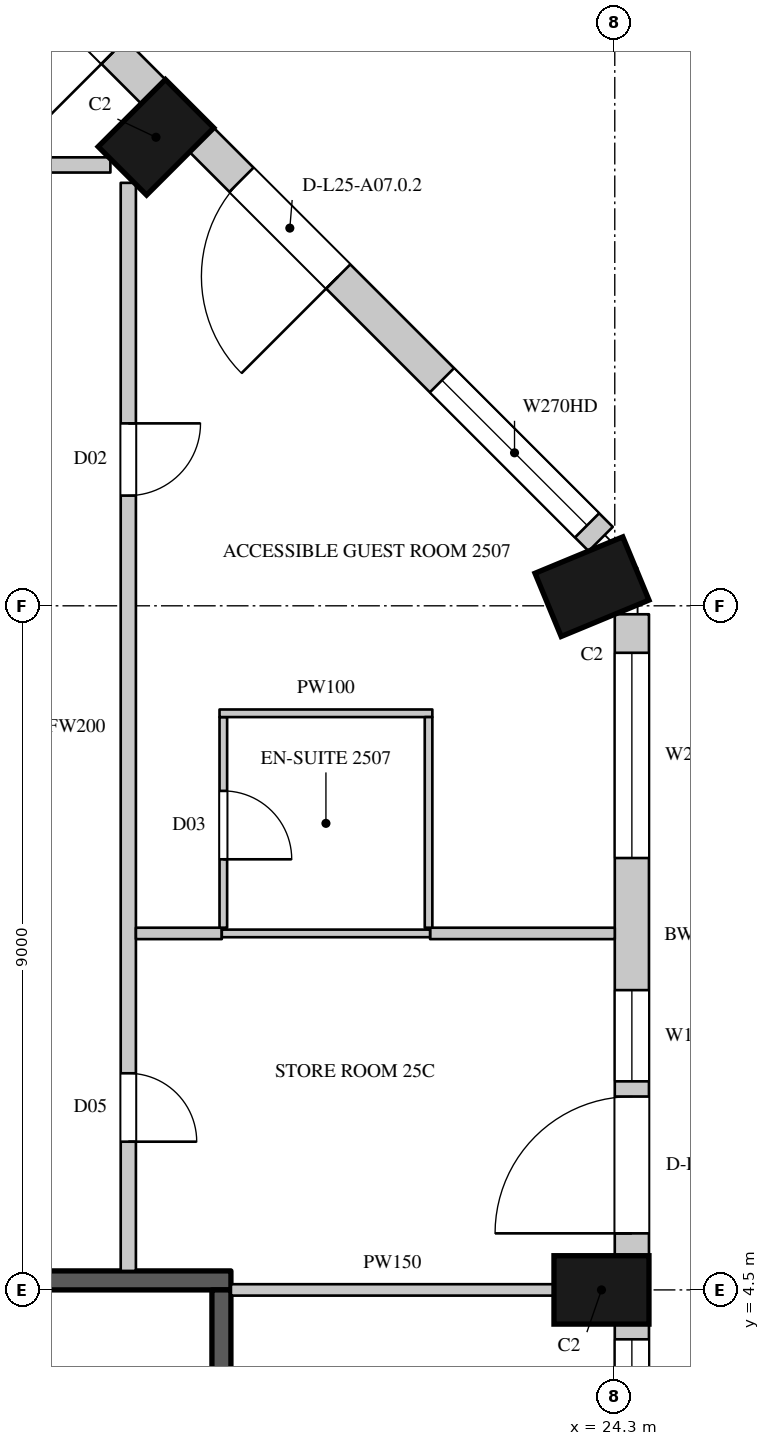
"""IFC4 building model, lengths in metres.
Left out: names, types, materials, properties, quantities, classifications, styles, units other than length and angle.
Written with IfcOpenShell. Run it as: python <this file> out.ifc"""

import sys

from ifc_helpers import new_model, si_unit, direction, frame, frame_2d, origin, origin_2d, place, context, subcontext, project, spatial, rectangle, extrude, element, fill, save


model = new_model("IFC4")
c1 = context("Model", 3, precision=1e-05, world=origin(), true_north=direction((0.0, 1.0)))
c2 = subcontext(c1, "Body", "Model", "MODEL_VIEW")
j1 = project(units=[si_unit("LENGTHUNIT", "METRE"), si_unit("PLANEANGLEUNIT", "RADIAN")], contexts=[c1])
p1 = place(None, origin())
s1 = spatial("IfcSite", under=j1, at=p1, CompositionType="ELEMENT")
p2 = place(p1, origin())
s2 = spatial("IfcBuilding", under=s1, at=p2, CompositionType="ELEMENT")
p3 = place(p2, frame((0.0, 0.0, 120.3)))
s3 = spatial("IfcBuildingStorey", under=s2, at=p3, CompositionType="ELEMENT", Elevation=120.3)
for number, where, z_axis, x_axis in (
    (1, (24.125, 4.5, 0.0), (0.0, 0.0, 1.0), (0.0, 1.0, 0.0)),
    (2, (24.0, 13.752, 0.0), (0.0, 0.0, 1.0), (-0.383, 0.924, 0.0)),
    (3, (18.264, 19.664, 0.0), (0.0, 0.0, 1.0), (-0.707, 0.707, 0.0)),
):
    element("IfcColumn", number, at=place(p3, frame(where, z_axis=z_axis, x_axis=x_axis)), inside=s3, PredefinedType="COLUMN", context=c2, shape_type="SweptSolid", body=[
        extrude(rectangle(XDim=0.9, YDim=1.25, at=origin_2d()), origin(), (0.0, 0.0, 1.0), 3.6),
    ])
p4 = place(p3, frame((24.525, -4.05, 0.0), z_axis=(0.0, 0.0, 1.0), x_axis=(0.0, 1.0, 0.0)))
e4 = element("IfcWall", 4, at=p4, inside=s3, PredefinedType="SOLIDWALL", context=c2, shape_type="SweptSolid", body=[
    extrude(rectangle(XDim=8.1, YDim=0.45, at=frame_2d((4.05, 0.0))), origin(), (0.0, 0.0, 1.0), 3.3),
])
p5 = place(p4, frame((0.2, 0.0, 0.0)))
e5 = element("IfcOpeningElement", 5, at=p5, cuts=e4, PredefinedType="OPENING", context=c2, shape_type="SweptSolid", body=[
    extrude(rectangle(XDim=1.8, YDim=2.4, at=frame_2d((0.9, 1.2))), frame((0.0, 0.235, 0.0), z_axis=(0.0, -1.0, 0.0), x_axis=(1.0, 0.0, 0.0)), (0.0, 0.0, 1.0), 0.47),
])
p6 = place(p4, frame((2.2, 0.0, 1.05)))
e6 = element("IfcOpeningElement", 6, at=p6, cuts=e4, PredefinedType="OPENING", context=c2, shape_type="SweptSolid", body=[
    extrude(rectangle(XDim=1.2, YDim=2.0, at=frame_2d((0.6, 1.0))), frame((0.0, 0.235, 0.0), z_axis=(0.0, -1.0, 0.0), x_axis=(1.0, 0.0, 0.0)), (0.0, 0.0, 1.0), 0.47),
])
p7 = place(p4, frame((4.7, 0.0, 0.0)))
e7 = element("IfcOpeningElement", 7, at=p7, cuts=e4, PredefinedType="OPENING", context=c2, shape_type="SweptSolid", body=[
    extrude(rectangle(XDim=1.8, YDim=2.4, at=frame_2d((0.9, 1.2))), frame((0.0, 0.235, 0.0), z_axis=(0.0, -1.0, 0.0), x_axis=(1.0, 0.0, 0.0)), (0.0, 0.0, 1.0), 0.47),
])
p8 = place(p4, frame((6.7, 0.0, 1.05)))
e8 = element("IfcOpeningElement", 8, at=p8, cuts=e4, PredefinedType="OPENING", context=c2, shape_type="SweptSolid", body=[
    extrude(rectangle(XDim=1.2, YDim=2.0, at=frame_2d((0.6, 1.0))), frame((0.0, 0.235, 0.0), z_axis=(0.0, -1.0, 0.0), x_axis=(1.0, 0.0, 0.0)), (0.0, 0.0, 1.0), 0.47),
])
p9 = place(p3, frame((24.525, 4.95, 0.0), z_axis=(0.0, 0.0, 1.0), x_axis=(0.0, 1.0, 0.0)))
e9 = element("IfcWall", 9, at=p9, inside=s3, PredefinedType="SOLIDWALL", context=c2, shape_type="SweptSolid", body=[
    extrude(rectangle(XDim=8.439, YDim=0.45, at=frame_2d((4.219, 0.0))), origin(), (0.0, 0.0, 1.0), 3.3),
])
p10 = place(p9, frame((0.294, 0.0, 0.0)))
e10 = element("IfcOpeningElement", 10, at=p10, cuts=e9, PredefinedType="OPENING", context=c2, shape_type="SweptSolid", body=[
    extrude(rectangle(XDim=1.8, YDim=2.4, at=frame_2d((0.9, 1.2))), frame((0.0, 0.235, 0.0), z_axis=(0.0, -1.0, 0.0), x_axis=(1.0, 0.0, 0.0)), (0.0, 0.0, 1.0), 0.47),
])
p11 = place(p9, frame((2.294, 0.0, 1.05)))
e11 = element("IfcOpeningElement", 11, at=p11, cuts=e9, PredefinedType="OPENING", context=c2, shape_type="SweptSolid", body=[
    extrude(rectangle(XDim=1.2, YDim=2.0, at=frame_2d((0.6, 1.0))), frame((0.0, 0.235, 0.0), z_axis=(0.0, -1.0, 0.0), x_axis=(1.0, 0.0, 0.0)), (0.0, 0.0, 1.0), 0.47),
])
p12 = place(p9, frame((5.232, 0.0, 1.05)))
e12 = element("IfcOpeningElement", 12, at=p12, cuts=e9, PredefinedType="OPENING", context=c2, shape_type="SweptSolid", body=[
    extrude(rectangle(XDim=2.7, YDim=2.0, at=frame_2d((1.35, 1.0))), frame((0.0, 0.235, 0.0), z_axis=(0.0, -1.0, 0.0), x_axis=(1.0, 0.0, 0.0)), (0.0, 0.0, 1.0), 0.47),
])
p13 = place(p3, frame((24.115, 14.379, 0.0), z_axis=(0.0, 0.0, 1.0), x_axis=(-0.707106781187, 0.707106781187, 0.0)))
e13 = element("IfcWall", 13, at=p13, inside=s3, PredefinedType="SOLIDWALL", context=c2, shape_type="SweptSolid", body=[
    extrude(rectangle(XDim=7.424, YDim=0.45, at=frame_2d((3.712, 0.0))), origin(), (0.0, 0.0, 1.0), 3.3),
])
p14 = place(p13, frame((0.253, 0.0, 1.05)))
e14 = element("IfcOpeningElement", 14, at=p14, cuts=e13, PredefinedType="OPENING", context=c2, shape_type="SweptSolid", body=[
    extrude(rectangle(XDim=2.7, YDim=2.0, at=frame_2d((1.35, 1.0))), frame((0.0, 0.235, 0.0), z_axis=(0.0, -1.0, 0.0), x_axis=(1.0, 0.0, 0.0)), (0.0, 0.0, 1.0), 0.47),
])
p15 = place(p13, frame((4.884, 0.0, 0.0)))
e15 = element("IfcOpeningElement", 15, at=p15, cuts=e13, PredefinedType="OPENING", context=c2, shape_type="SweptSolid", body=[
    extrude(rectangle(XDim=1.8, YDim=2.4, at=frame_2d((0.9, 1.2))), frame((0.0, 0.235, 0.0), z_axis=(0.0, -1.0, 0.0), x_axis=(1.0, 0.0, 0.0)), (0.0, 0.0, 1.0), 0.47),
])
p16 = place(p3, frame((18.229, 20.265, 0.0), z_axis=(0.0, 0.0, 1.0), x_axis=(-0.707106781187, 0.707106781187, 0.0)))
e16 = element("IfcWall", 16, at=p16, inside=s3, PredefinedType="SOLIDWALL", context=c2, shape_type="SweptSolid", body=[
    extrude(rectangle(XDim=7.424, YDim=0.45, at=frame_2d((3.712, 0.0))), origin(), (0.0, 0.0, 1.0), 3.3),
])
p17 = place(p16, frame((0.74, 0.0, 0.0)))
e17 = element("IfcOpeningElement", 17, at=p17, cuts=e16, PredefinedType="OPENING", context=c2, shape_type="SweptSolid", body=[
    extrude(rectangle(XDim=1.8, YDim=2.4, at=frame_2d((0.9, 1.2))), frame((0.0, 0.235, 0.0), z_axis=(0.0, -1.0, 0.0), x_axis=(1.0, 0.0, 0.0)), (0.0, 0.0, 1.0), 0.47),
])
p18 = place(p16, frame((4.471, 0.0, 1.05)))
e18 = element("IfcOpeningElement", 18, at=p18, cuts=e16, PredefinedType="OPENING", context=c2, shape_type="SweptSolid", body=[
    extrude(rectangle(XDim=2.7, YDim=2.0, at=frame_2d((1.35, 1.0))), frame((0.0, 0.235, 0.0), z_axis=(0.0, -1.0, 0.0), x_axis=(1.0, 0.0, 0.0)), (0.0, 0.0, 1.0), 0.47),
])
p19 = place(p3, frame((23.15, 16.864, 0.0), z_axis=(0.0, 0.0, 1.0), x_axis=(-0.707106781187, 0.707106781187, 0.0)))
e19 = element("IfcWall", 19, at=p19, inside=s3, PredefinedType="SOLIDWALL", context=c2, shape_type="SweptSolid", body=[
    extrude(rectangle(XDim=1.445, YDim=0.45, at=frame_2d((0.722, 0.0))), origin(), (0.0, 0.0, 1.0), 0.6),
])
p20 = place(p3, frame((19.937, 20.078, 0.0), z_axis=(0.0, 0.0, 1.0), x_axis=(-0.707106781187, 0.707106781187, 0.0)))
e20 = element("IfcWall", 20, at=p20, inside=s3, PredefinedType="SOLIDWALL", context=c2, shape_type="SweptSolid", body=[
    extrude(rectangle(XDim=1.781, YDim=0.45, at=frame_2d((0.89, 0.0))), origin(), (0.0, 0.0, 1.0), 0.6),
])
p21 = place(p3, frame((-20.8, 19.3, 0.0), z_axis=(0.0, 0.0, 1.0), x_axis=(1.0, 0.0, 0.0)))
e21 = element("IfcWall", 21, at=p21, inside=s3, PredefinedType="PARTITIONING", context=c2, shape_type="SweptSolid", body=[
    extrude(rectangle(XDim=38.464, YDim=0.2, at=frame_2d((19.232, 0.0))), origin(), (0.0, 0.0, 1.0), 3.3),
])
p22 = place(p21, frame((24.05, 0.0, 0.0)))
e22 = element("IfcOpeningElement", 22, at=p22, cuts=e21, PredefinedType="OPENING", context=c2, shape_type="SweptSolid", body=[
    extrude(rectangle(XDim=0.9, YDim=2.2, at=frame_2d((0.45, 1.1))), frame((0.0, 0.11, 0.0), z_axis=(0.0, -1.0, 0.0), x_axis=(1.0, 0.0, 0.0)), (0.0, 0.0, 1.0), 0.22),
])
p23 = place(p21, frame((11.2, 0.0, 0.0)))
e23 = element("IfcOpeningElement", 23, at=p23, cuts=e21, PredefinedType="OPENING", context=c2, shape_type="SweptSolid", body=[
    extrude(rectangle(XDim=0.95, YDim=2.2, at=frame_2d((0.475, 1.1))), frame((0.0, 0.11, 0.0), z_axis=(0.0, -1.0, 0.0), x_axis=(1.0, 0.0, 0.0)), (0.0, 0.0, 1.0), 0.22),
])
p24 = place(p21, frame((15.05, 0.0, 0.0)))
e24 = element("IfcOpeningElement", 24, at=p24, cuts=e21, PredefinedType="OPENING", context=c2, shape_type="SweptSolid", body=[
    extrude(rectangle(XDim=0.95, YDim=2.2, at=frame_2d((0.475, 1.1))), frame((0.0, 0.11, 0.0), z_axis=(0.0, -1.0, 0.0), x_axis=(1.0, 0.0, 0.0)), (0.0, 0.0, 1.0), 0.22),
])
p25 = place(p21, frame((32.0, 0.0, 0.0)))
e25 = element("IfcOpeningElement", 25, at=p25, cuts=e21, PredefinedType="OPENING", context=c2, shape_type="SweptSolid", body=[
    extrude(rectangle(XDim=0.95, YDim=2.2, at=frame_2d((0.475, 1.1))), frame((0.0, 0.11, 0.0), z_axis=(0.0, -1.0, 0.0), x_axis=(1.0, 0.0, 0.0)), (0.0, 0.0, 1.0), 0.22),
])
p26 = place(p3, frame((17.9, 4.75, 0.0), z_axis=(0.0, 0.0, 1.0), x_axis=(0.0, 1.0, 0.0)))
e26 = element("IfcWall", 26, at=p26, inside=s3, PredefinedType="PARTITIONING", context=c2, shape_type="SweptSolid", body=[
    extrude(rectangle(XDim=14.314, YDim=0.2, at=frame_2d((7.157, 0.0))), origin(), (0.0, 0.0, 1.0), 3.3),
])
p27 = place(p26, frame((1.7, 0.0, 0.0)))
e27 = element("IfcOpeningElement", 27, at=p27, cuts=e26, PredefinedType="OPENING", context=c2, shape_type="SweptSolid", body=[
    extrude(rectangle(XDim=0.9, YDim=2.2, at=frame_2d((0.45, 1.1))), frame((0.0, 0.11, 0.0), z_axis=(0.0, -1.0, 0.0), x_axis=(1.0, 0.0, 0.0)), (0.0, 0.0, 1.0), 0.22),
])
p28 = place(p26, frame((10.2, 0.0, 0.0)))
e28 = element("IfcOpeningElement", 28, at=p28, cuts=e26, PredefinedType="OPENING", context=c2, shape_type="SweptSolid", body=[
    extrude(rectangle(XDim=0.95, YDim=2.2, at=frame_2d((0.475, 1.1))), frame((0.0, 0.11, 0.0), z_axis=(0.0, -1.0, 0.0), x_axis=(1.0, 0.0, 0.0)), (0.0, 0.0, 1.0), 0.22),
])
p29 = place(p3, frame((18.0, 9.19, 0.0), z_axis=(0.0, 0.0, 1.0), x_axis=(1.0, 0.0, 0.0)))
e29 = element("IfcWall", 29, at=p29, inside=s3, PredefinedType="PARTITIONING", context=c2, shape_type="SweptSolid", body=[
    extrude(rectangle(XDim=1.13, YDim=0.15, at=frame_2d((0.565, 0.0))), origin(), (0.0, 0.0, 1.0), 2.65),
])
p30 = place(p3, frame((19.25, 4.5, 0.0), z_axis=(0.0, 0.0, 1.0), x_axis=(1.0, 0.0, 0.0)))
e30 = element("IfcWall", 30, at=p30, inside=s3, PredefinedType="PARTITIONING", context=c2, shape_type="SweptSolid", body=[
    extrude(rectangle(XDim=4.25, YDim=0.15, at=frame_2d((2.125, 0.0))), origin(), (0.0, 0.0, 1.0), 3.3),
])
p31 = place(p3, frame((21.87, 9.19, 0.0), z_axis=(0.0, 0.0, 1.0), x_axis=(1.0, 0.0, 0.0)))
e31 = element("IfcWall", 31, at=p31, inside=s3, PredefinedType="PARTITIONING", context=c2, shape_type="SweptSolid", body=[
    extrude(rectangle(XDim=2.43, YDim=0.15, at=frame_2d((1.215, 0.0))), origin(), (0.0, 0.0, 1.0), 2.65),
])
p32 = place(p3, frame((14.55, 4.625, 0.0), z_axis=(0.0, 0.0, 1.0), x_axis=(1.0, 0.0, 0.0)))
e32 = element("IfcWall", 32, at=p32, inside=s3, PredefinedType="SHEAR", context=c2, shape_type="SweptSolid", body=[
    extrude(rectangle(XDim=4.7, YDim=0.25, at=frame_2d((2.35, 0.0))), origin(), (0.0, 0.0, 1.0), 3.3),
])
p33 = place(p3, frame((19.125, -4.5, 0.0), z_axis=(0.0, 0.0, 1.0), x_axis=(0.0, 1.0, 0.0)))
e33 = element("IfcWall", 33, at=p33, inside=s3, PredefinedType="SHEAR", context=c2, shape_type="SweptSolid", body=[
    extrude(rectangle(XDim=9.0, YDim=0.25, at=frame_2d((4.5, 0.0))), origin(), (0.0, 0.0, 1.0), 3.3),
])
p34 = place(p3, frame((19.13, 9.19, 0.0), z_axis=(0.0, 0.0, 1.0), x_axis=(1.0, 0.0, 0.0)))
e34 = element("IfcWall", 34, at=p34, inside=s3, PredefinedType="PARTITIONING", context=c2, shape_type="SweptSolid", body=[
    extrude(rectangle(XDim=2.74, YDim=0.1, at=frame_2d((1.37, 0.0))), origin(), (0.0, 0.0, 1.0), 2.65),
])
p35 = place(p3, frame((19.15, 9.265, 0.0), z_axis=(0.0, 0.0, 1.0), x_axis=(0.0, 1.0, 0.0)))
e35 = element("IfcWall", 35, at=p35, inside=s3, PredefinedType="PARTITIONING", context=c2, shape_type="SweptSolid", body=[
    extrude(rectangle(XDim=2.771, YDim=0.1, at=frame_2d((1.385, 0.0))), origin(), (0.0, 0.0, 1.0), 3.3),
])
p36 = place(p35, frame((0.9, 0.0, 0.0)))
e36 = element("IfcOpeningElement", 36, at=p36, cuts=e35, PredefinedType="OPENING", context=c2, shape_type="SweptSolid", body=[
    extrude(rectangle(XDim=0.9, YDim=2.2, at=frame_2d((0.45, 1.1))), frame((0.0, 0.06, 0.0), z_axis=(0.0, -1.0, 0.0), x_axis=(1.0, 0.0, 0.0)), (0.0, 0.0, 1.0), 0.12),
])
p37 = place(p3, frame((19.1, 12.086, 0.0), z_axis=(0.0, 0.0, 1.0), x_axis=(1.0, 0.0, 0.0)))
e37 = element("IfcWall", 37, at=p37, inside=s3, PredefinedType="PARTITIONING", context=c2, shape_type="SweptSolid", body=[
    extrude(rectangle(XDim=2.8, YDim=0.1, at=frame_2d((1.4, 0.0))), origin(), (0.0, 0.0, 1.0), 3.3),
])
p38 = place(p3, frame((21.85, 9.265, 0.0), z_axis=(0.0, 0.0, 1.0), x_axis=(0.0, 1.0, 0.0)))
e38 = element("IfcWall", 38, at=p38, inside=s3, PredefinedType="PARTITIONING", context=c2, shape_type="SweptSolid", body=[
    extrude(rectangle(XDim=2.771, YDim=0.1, at=frame_2d((1.385, 0.0))), origin(), (0.0, 0.0, 1.0), 3.3),
])
p39 = place(p8, origin())
e39 = element("IfcWindow", 39, at=p39, inside=s3, PartitioningType="SINGLE_PANEL", PredefinedType="WINDOW", context=c2, shape_type="SweptSolid", body=[
    extrude(rectangle(XDim=1.2, YDim=2.0, at=frame_2d((0.6, 1.0))), frame((0.0, 0.135, 0.0), z_axis=(0.0, -1.0, 0.0), x_axis=(1.0, 0.0, 0.0)), (0.0, 0.0, 1.0), 0.06),
])
fill(e8, e39)
p40 = place(p10, origin())
e40 = element("IfcDoor", 40, at=p40, inside=s3, OperationType="SLIDING_TO_LEFT", PredefinedType="DOOR", context=c2, shape_type="SweptSolid", body=[
    extrude(rectangle(XDim=1.8, YDim=2.4, at=frame_2d((0.9, 1.2))), frame((0.0, 0.13, 0.0), z_axis=(0.0, -1.0, 0.0), x_axis=(1.0, 0.0, 0.0)), (0.0, 0.0, 1.0), 0.05),
])
fill(e10, e40)
p41 = place(p11, origin())
e41 = element("IfcWindow", 41, at=p41, inside=s3, PartitioningType="SINGLE_PANEL", PredefinedType="WINDOW", context=c2, shape_type="SweptSolid", body=[
    extrude(rectangle(XDim=1.2, YDim=2.0, at=frame_2d((0.6, 1.0))), frame((0.0, 0.135, 0.0), z_axis=(0.0, -1.0, 0.0), x_axis=(1.0, 0.0, 0.0)), (0.0, 0.0, 1.0), 0.06),
])
fill(e11, e41)
p42 = place(p12, origin())
e42 = element("IfcWindow", 42, at=p42, inside=s3, PartitioningType="SINGLE_PANEL", PredefinedType="WINDOW", context=c2, shape_type="SweptSolid", body=[
    extrude(rectangle(XDim=2.7, YDim=2.0, at=frame_2d((1.35, 1.0))), frame((0.0, 0.135, 0.0), z_axis=(0.0, -1.0, 0.0), x_axis=(1.0, 0.0, 0.0)), (0.0, 0.0, 1.0), 0.06),
])
fill(e12, e42)
p43 = place(p14, origin())
e43 = element("IfcWindow", 43, at=p43, inside=s3, PartitioningType="SINGLE_PANEL", PredefinedType="WINDOW", context=c2, shape_type="SweptSolid", body=[
    extrude(rectangle(XDim=2.7, YDim=2.0, at=frame_2d((1.35, 1.0))), frame((0.0, 0.135, 0.0), z_axis=(0.0, -1.0, 0.0), x_axis=(1.0, 0.0, 0.0)), (0.0, 0.0, 1.0), 0.06),
])
fill(e14, e43)
p44 = place(p15, origin())
e44 = element("IfcDoor", 44, at=p44, inside=s3, OperationType="SLIDING_TO_LEFT", PredefinedType="DOOR", context=c2, shape_type="SweptSolid", body=[
    extrude(rectangle(XDim=1.8, YDim=2.4, at=frame_2d((0.9, 1.2))), frame((0.0, 0.13, 0.0), z_axis=(0.0, -1.0, 0.0), x_axis=(1.0, 0.0, 0.0)), (0.0, 0.0, 1.0), 0.05),
])
fill(e15, e44)
p45 = place(p17, origin())
e45 = element("IfcDoor", 45, at=p45, inside=s3, OperationType="SLIDING_TO_LEFT", PredefinedType="DOOR", context=c2, shape_type="SweptSolid", body=[
    extrude(rectangle(XDim=1.8, YDim=2.4, at=frame_2d((0.9, 1.2))), frame((0.0, 0.13, 0.0), z_axis=(0.0, -1.0, 0.0), x_axis=(1.0, 0.0, 0.0)), (0.0, 0.0, 1.0), 0.05),
])
fill(e17, e45)
p46 = place(p27, origin())
e46 = element("IfcDoor", 46, at=p46, inside=s3, OperationType="SINGLE_SWING_RIGHT", PredefinedType="DOOR", context=c2, shape_type="SweptSolid", body=[
    extrude(rectangle(XDim=0.9, YDim=2.2, at=frame_2d((0.45, 1.1))), frame((0.0, 0.025, 0.0), z_axis=(0.0, -1.0, 0.0), x_axis=(1.0, 0.0, 0.0)), (0.0, 0.0, 1.0), 0.05),
])
fill(e27, e46)
p47 = place(p28, origin())
e47 = element("IfcDoor", 47, at=p47, inside=s3, OperationType="SINGLE_SWING_LEFT", PredefinedType="DOOR", context=c2, shape_type="SweptSolid", body=[
    extrude(rectangle(XDim=0.95, YDim=2.2, at=frame_2d((0.475, 1.1))), frame((0.0, 0.025, 0.0), z_axis=(0.0, -1.0, 0.0), x_axis=(1.0, 0.0, 0.0)), (0.0, 0.0, 1.0), 0.05),
])
fill(e28, e47)
p48 = place(p36, origin())
e48 = element("IfcDoor", 48, at=p48, inside=s3, OperationType="SINGLE_SWING_RIGHT", PredefinedType="DOOR", context=c2, shape_type="SweptSolid", body=[
    extrude(rectangle(XDim=0.9, YDim=2.2, at=frame_2d((0.45, 1.1))), frame((0.0, 0.025, 0.0), z_axis=(0.0, -1.0, 0.0), x_axis=(1.0, 0.0, 0.0)), (0.0, 0.0, 1.0), 0.05),
])
fill(e36, e48)
save(model, sys.argv[1])
